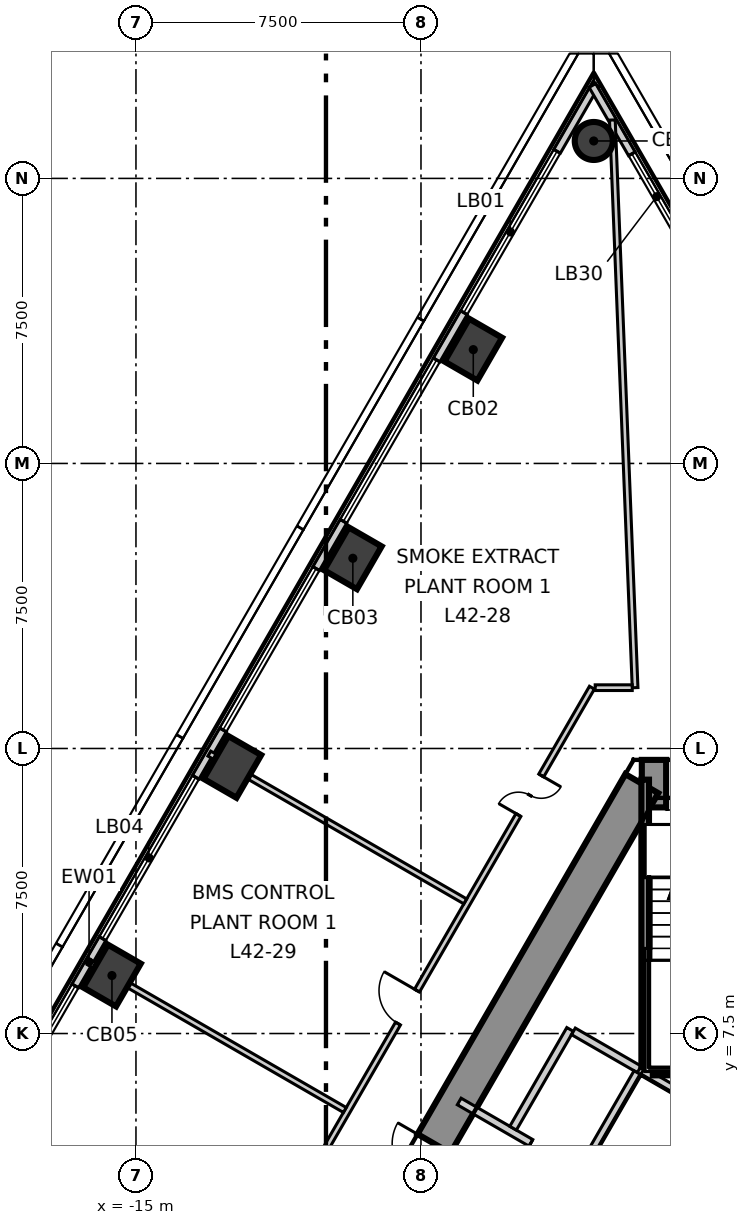
"""IFC4 building model, lengths in metres.
Left out: names, types, materials, properties, quantities, classifications, styles, units other than length and angle.
Written with IfcOpenShell. Run it as: python <this file> out.ifc"""

import sys

from ifc_helpers import new_model, si_unit, direction, frame, frame_2d, origin, origin_2d, place, context, subcontext, project, spatial, polyline, rectangle, circle, outline, extrude, element, fill, save


model = new_model("IFC4")
c1 = context("Model", 3, precision=1e-05, world=origin(), true_north=direction((0.0, 1.0)))
c2 = subcontext(c1, "Body", "Model", "MODEL_VIEW")
j1 = project(units=[si_unit("LENGTHUNIT", "METRE"), si_unit("PLANEANGLEUNIT", "RADIAN")], contexts=[c1])
p1 = place(None, origin())
s1 = spatial("IfcSite", under=j1, at=p1, CompositionType="ELEMENT")
p2 = place(p1, origin())
s2 = spatial("IfcBuilding", under=s1, at=p2, CompositionType="ELEMENT")
p3 = place(p2, frame((0.0, 0.0, 180.8)))
s3 = spatial("IfcBuildingStorey", under=s2, at=p3, CompositionType="ELEMENT", Elevation=180.8)
p4 = place(p3, frame((1.689, 14.075, -0.6), z_axis=(0.0, 0.0, 1.0), x_axis=(-1.0, 0.0, 0.0)))
e1 = element("IfcWall", 1, at=p4, inside=s3, PredefinedType="SHEAR", context=c2, shape_type="SweptSolid", body=[
    extrude(outline(polyline([(-0.216, -0.625), (1.689, -0.625), (3.594, -0.625), (3.161, 0.625), (1.689, 0.625), (0.217, 0.625), (-0.216, -0.625)])), origin(), (0.0, 0.0, 1.0), 4.5),
])
p5 = place(p4, frame((1.336, 0.0, 0.6)))
e2 = element("IfcOpeningElement", 2, at=p5, cuts=e1, PredefinedType="OPENING", context=c2, shape_type="SweptSolid", body=[
    extrude(rectangle(XDim=1.4, YDim=2.1, at=frame_2d((0.7, 1.05))), frame((0.0, 0.635, 0.0), z_axis=(0.0, -1.0, 0.0), x_axis=(1.0, 0.0, 0.0)), (0.0, 0.0, 1.0), 1.27),
])
p6 = place(p3, frame((-1.689, 14.075, -0.6), z_axis=(0.0, 0.0, 1.0), x_axis=(-0.500003116884, -0.866023604243, 0.0)))
e3 = element("IfcWall", 3, at=p6, inside=s3, PredefinedType="SHEAR", context=c2, shape_type="SweptSolid", body=[
    extrude(outline(polyline([(-0.433, -0.5), (1.53, -0.5), (3.493, -0.5), (5.456, -0.5), (7.419, -0.5), (9.382, -0.5), (11.345, -0.5), (13.308, -0.5), (15.271, -0.5), (17.234, -0.5), (19.197, -0.5), (21.16, -0.5), (23.123, -0.5), (22.257, 0.5), (20.273, 0.5), (18.289, 0.5), (16.305, 0.5), (14.321, 0.5), (12.337, 0.5), (10.353, 0.5), (8.369, 0.5), (6.385, 0.5), (4.401, 0.5), (2.417, 0.5), (0.433, 0.5), (-0.433, -0.5)])), origin(), (0.0, 0.0, 1.0), 4.5),
])
p7 = place(p6, frame((10.939, 0.0, 0.6)))
e4 = element("IfcOpeningElement", 4, at=p7, cuts=e3, PredefinedType="OPENING", context=c2, shape_type="SweptSolid", body=[
    extrude(rectangle(XDim=1.1, YDim=2.1, at=frame_2d((0.55, 1.05))), frame((0.0, 0.51, 0.0), z_axis=(0.0, -1.0, 0.0), x_axis=(1.0, 0.0, 0.0)), (0.0, 0.0, 1.0), 1.02),
])
p8 = place(p3, frame((-2.954, 30.985, -0.6), z_axis=(0.0, 0.0, 1.0), x_axis=(0.5, 0.866025403784, 0.0)))
e5 = element("IfcColumn", 5, at=p8, inside=s3, PredefinedType="COLUMN", context=c2, shape_type="SweptSolid", body=[
    extrude(circle(Radius=0.5, at=origin_2d()), origin(), (0.0, 0.0, 1.0), 4.5),
])
for number, where, z_axis, x_axis in (
    (6, (-6.124, 25.495, -0.6), (0.0, 0.0, 1.0), (0.5, 0.866, 0.0)),
    (7, (-9.293, 20.005, -0.6), (0.0, 0.0, 1.0), (0.5, 0.866, 0.0)),
    (8, (-12.463, 14.515, -0.6), (0.0, 0.0, 1.0), (0.5, 0.866, 0.0)),
    (9, (-15.632, 9.026, -0.6), (0.0, 0.0, 1.0), (0.5, 0.866, 0.0)),
):
    element("IfcColumn", number, at=place(p3, frame(where, z_axis=z_axis, x_axis=x_axis)), inside=s3, PredefinedType="COLUMN", context=c2, shape_type="SweptSolid", body=[
        extrude(rectangle(XDim=1.3, YDim=1.0, at=origin_2d()), origin(), (0.0, 0.0, 1.0), 4.5),
    ])
p9 = place(p3, frame((-2.909, 32.463, 0.0), z_axis=(0.0, 0.0, 1.0), x_axis=(-0.500011769953, -0.866018608292, 0.0)))
e10 = element("IfcWall", 10, at=p9, inside=s3, PredefinedType="ELEMENTEDWALL", context=c2, shape_type="SweptSolid", body=[
    extrude(rectangle(XDim=53.299, YDim=0.2, at=frame_2d((26.649, 0.0))), origin(), (0.0, 0.0, 1.0), 3.9),
])
p10 = place(p9, frame((2.022, 0.0, 0.6)))
e11 = element("IfcOpeningElement", 11, at=p10, cuts=e10, PredefinedType="OPENING", context=c2, shape_type="SweptSolid", body=[
    extrude(rectangle(XDim=4.9, YDim=3.0, at=frame_2d((2.45, 1.5))), frame((0.0, 0.11, 0.0), z_axis=(0.0, -1.0, 0.0), x_axis=(1.0, 0.0, 0.0)), (0.0, 0.0, 1.0), 0.22),
])
p11 = place(p9, frame((8.361, 0.0, 0.6)))
e12 = element("IfcOpeningElement", 12, at=p11, cuts=e10, PredefinedType="OPENING", context=c2, shape_type="SweptSolid", body=[
    extrude(rectangle(XDim=4.9, YDim=3.0, at=frame_2d((2.45, 1.5))), frame((0.0, 0.11, 0.0), z_axis=(0.0, -1.0, 0.0), x_axis=(1.0, 0.0, 0.0)), (0.0, 0.0, 1.0), 0.22),
])
p12 = place(p9, frame((14.7, 0.0, 0.6)))
e13 = element("IfcOpeningElement", 13, at=p12, cuts=e10, PredefinedType="OPENING", context=c2, shape_type="SweptSolid", body=[
    extrude(rectangle(XDim=4.9, YDim=3.0, at=frame_2d((2.45, 1.5))), frame((0.0, 0.11, 0.0), z_axis=(0.0, -1.0, 0.0), x_axis=(1.0, 0.0, 0.0)), (0.0, 0.0, 1.0), 0.22),
])
p13 = place(p9, frame((21.04, 0.0, 0.6)))
e14 = element("IfcOpeningElement", 14, at=p13, cuts=e10, PredefinedType="OPENING", context=c2, shape_type="SweptSolid", body=[
    extrude(rectangle(XDim=4.9, YDim=3.0, at=frame_2d((2.45, 1.5))), frame((0.0, 0.11, 0.0), z_axis=(0.0, -1.0, 0.0), x_axis=(1.0, 0.0, 0.0)), (0.0, 0.0, 1.0), 0.22),
])
p14 = place(p9, frame((27.379, 0.0, 0.6)))
e15 = element("IfcOpeningElement", 15, at=p14, cuts=e10, PredefinedType="OPENING", context=c2, shape_type="SweptSolid", body=[
    extrude(rectangle(XDim=4.9, YDim=3.0, at=frame_2d((2.45, 1.5))), frame((0.0, 0.11, 0.0), z_axis=(0.0, -1.0, 0.0), x_axis=(1.0, 0.0, 0.0)), (0.0, 0.0, 1.0), 0.22),
])
p15 = place(p9, frame((33.718, 0.0, 0.6)))
e16 = element("IfcOpeningElement", 16, at=p15, cuts=e10, PredefinedType="OPENING", context=c2, shape_type="SweptSolid", body=[
    extrude(rectangle(XDim=4.9, YDim=3.0, at=frame_2d((2.45, 1.5))), frame((0.0, 0.11, 0.0), z_axis=(0.0, -1.0, 0.0), x_axis=(1.0, 0.0, 0.0)), (0.0, 0.0, 1.0), 0.22),
])
p16 = place(p9, frame((40.057, 0.0, 0.6)))
e17 = element("IfcOpeningElement", 17, at=p16, cuts=e10, PredefinedType="OPENING", context=c2, shape_type="SweptSolid", body=[
    extrude(rectangle(XDim=4.9, YDim=3.0, at=frame_2d((2.45, 1.5))), frame((0.0, 0.11, 0.0), z_axis=(0.0, -1.0, 0.0), x_axis=(1.0, 0.0, 0.0)), (0.0, 0.0, 1.0), 0.22),
])
p17 = place(p9, frame((46.396, 0.0, 0.6)))
e18 = element("IfcOpeningElement", 18, at=p17, cuts=e10, PredefinedType="OPENING", context=c2, shape_type="SweptSolid", body=[
    extrude(rectangle(XDim=4.9, YDim=3.0, at=frame_2d((2.45, 1.5))), frame((0.0, 0.11, 0.0), z_axis=(0.0, -1.0, 0.0), x_axis=(1.0, 0.0, 0.0)), (0.0, 0.0, 1.0), 0.22),
])
p18 = place(p3, frame((0.045, 27.19, 0.0), z_axis=(0.0, 0.0, 1.0), x_axis=(-0.499916304465, 0.866073720032, 0.0)))
e19 = element("IfcWall", 19, at=p18, inside=s3, PredefinedType="ELEMENTEDWALL", context=c2, shape_type="SweptSolid", body=[
    extrude(rectangle(XDim=6.069, YDim=0.2, at=frame_2d((3.034, 0.0))), origin(), (0.0, 0.0, 1.0), 3.9),
])
p19 = place(p18, frame((1.39, 0.0, 0.6)))
e20 = element("IfcOpeningElement", 20, at=p19, cuts=e19, PredefinedType="OPENING", context=c2, shape_type="SweptSolid", body=[
    extrude(rectangle(XDim=2.6, YDim=3.0, at=frame_2d((1.3, 1.5))), frame((0.0, 0.11, 0.0), z_axis=(0.0, -1.0, 0.0), x_axis=(1.0, 0.0, 0.0)), (0.0, 0.0, 1.0), 0.22),
])
p20 = place(p3, frame((-15.877, -5.7, 0.0), z_axis=(0.0, 0.0, 1.0), x_axis=(0.500001771058, 0.866024381261, 0.0)))
e21 = element("IfcWall", 21, at=p20, inside=s3, PredefinedType="PARTITIONING", context=c2, shape_type="SweptSolid", body=[
    extrude(rectangle(XDim=25.75, YDim=0.15, at=frame_2d((12.875, 0.0))), origin(), (0.0, 0.0, 1.0), 3.9),
])
p21 = place(p20, frame((21.882, 0.0, 0.0)))
e22 = element("IfcOpeningElement", 22, at=p21, cuts=e21, PredefinedType="OPENING", context=c2, shape_type="SweptSolid", body=[
    extrude(rectangle(XDim=1.2, YDim=2.1, at=frame_2d((0.6, 1.05))), frame((0.0, 0.085, 0.0), z_axis=(0.0, -1.0, 0.0), x_axis=(1.0, 0.0, 0.0)), (0.0, 0.0, 1.0), 0.17),
])
p22 = place(p20, frame((15.545, 0.0, 0.0)))
e23 = element("IfcOpeningElement", 23, at=p22, cuts=e21, PredefinedType="OPENING", context=c2, shape_type="SweptSolid", body=[
    extrude(rectangle(XDim=1.0, YDim=2.1, at=frame_2d((0.5, 1.05))), frame((0.0, 0.085, 0.0), z_axis=(0.0, -1.0, 0.0), x_axis=(1.0, 0.0, 0.0)), (0.0, 0.0, 1.0), 0.17),
])
p23 = place(p20, frame((5.838, 0.0, 0.0)))
e24 = element("IfcOpeningElement", 24, at=p23, cuts=e21, PredefinedType="OPENING", context=c2, shape_type="SweptSolid", body=[
    extrude(rectangle(XDim=1.2, YDim=2.1, at=frame_2d((0.6, 1.05))), frame((0.0, 0.085, 0.0), z_axis=(0.0, -1.0, 0.0), x_axis=(1.0, 0.0, 0.0)), (0.0, 0.0, 1.0), 0.17),
])
p24 = place(p3, frame((-16.238, 9.376, 0.0), z_axis=(0.0, 0.0, 1.0), x_axis=(0.8660261172, -0.499998764326, 0.0)))
e25 = element("IfcWall", 25, at=p24, inside=s3, PredefinedType="PARTITIONING", context=c2, shape_type="SweptSolid", body=[
    extrude(rectangle(XDim=7.776, YDim=0.15, at=frame_2d((3.888, 0.0))), origin(), (0.0, 0.0, 1.0), 3.4),
])
p25 = place(p3, frame((-13.069, 14.865, 0.0), z_axis=(0.0, 0.0, 1.0), x_axis=(0.8660261172, -0.499998764326, 0.0)))
e26 = element("IfcWall", 26, at=p25, inside=s3, PredefinedType="PARTITIONING", context=c2, shape_type="SweptSolid", body=[
    extrude(rectangle(XDim=7.776, YDim=0.15, at=frame_2d((3.888, 0.0))), origin(), (0.0, 0.0, 1.0), 3.9),
])
p26 = place(p3, frame((-2.464, 31.537, 0.0), z_axis=(0.0, 0.0, 1.0), x_axis=(0.040012389266, -0.999199183699, 0.0)))
e27 = element("IfcWall", 27, at=p26, inside=s3, PredefinedType="PARTITIONING", context=c2, shape_type="SweptSolid", body=[
    extrude(rectangle(XDim=14.949, YDim=0.15, at=frame_2d((7.475, 0.0))), origin(), (0.0, 0.0, 1.0), 3.2),
])
p27 = place(p3, frame((-2.916, 16.6, 0.0), z_axis=(0.0, 0.0, 1.0), x_axis=(1.0, 0.0, 0.0)))
e28 = element("IfcWall", 28, at=p27, inside=s3, PredefinedType="PARTITIONING", context=c2, shape_type="SweptSolid", body=[
    extrude(rectangle(XDim=0.975, YDim=0.15, at=frame_2d((0.488, 0.0))), origin(), (0.0, 0.0, 1.0), 3.9),
])
p28 = place(p3, frame((-6.494, 5.712, 0.0), z_axis=(0.0, 0.0, 1.0), x_axis=(0.866064137879, -0.499932904579, 0.0)))
e29 = element("IfcWall", 29, at=p28, inside=s3, PredefinedType="SOLIDWALL", context=c2, shape_type="SweptSolid", body=[
    extrude(rectangle(XDim=3.682, YDim=0.2, at=frame_2d((1.841, 0.0))), origin(), (0.0, 0.0, 1.0), 3.9),
])
p29 = place(p28, frame((2.18, 0.0, 0.0)))
e30 = element("IfcOpeningElement", 30, at=p29, cuts=e29, PredefinedType="OPENING", context=c2, shape_type="SweptSolid", body=[
    extrude(rectangle(XDim=0.9, YDim=2.1, at=frame_2d((0.45, 1.05))), frame((0.0, 0.11, 0.0), z_axis=(0.0, -1.0, 0.0), x_axis=(1.0, 0.0, 0.0)), (0.0, 0.0, 1.0), 0.22),
])
p30 = place(p3, frame((-5.076, 5.009, 0.0), z_axis=(0.0, 0.0, 1.0), x_axis=(0.50002537861, 0.866010750942, 0.0)))
e31 = element("IfcWall", 31, at=p30, inside=s3, PredefinedType="SOLIDWALL", context=c2, shape_type="SweptSolid", body=[
    extrude(rectangle(XDim=3.0, YDim=0.2, at=frame_2d((1.5, 0.0))), origin(), (0.0, 0.0, 1.0), 3.9),
])
p31 = place(p3, frame((-3.489, 7.557, 0.0), z_axis=(0.0, 0.0, 1.0), x_axis=(0.866010750942, -0.50002537861, 0.0)))
e32 = element("IfcWall", 32, at=p31, inside=s3, PredefinedType="SOLIDWALL", context=c2, shape_type="SweptSolid", body=[
    extrude(rectangle(XDim=2.0, YDim=0.2, at=frame_2d((1.0, 0.0))), origin(), (0.0, 0.0, 1.0), 3.9),
])
p32 = place(p3, frame((-3.257, 3.959, 0.0), z_axis=(0.0, 0.0, 1.0), x_axis=(0.50012328804, 0.865954211699, 0.0)))
e33 = element("IfcWall", 33, at=p32, inside=s3, PredefinedType="SOLIDWALL", context=c2, shape_type="SweptSolid", body=[
    extrude(rectangle(XDim=2.9, YDim=0.2, at=frame_2d((1.45, 0.0))), origin(), (0.0, 0.0, 1.0), 3.9),
])
p33 = place(p3, frame((-1.67, 6.507, 0.0), z_axis=(0.0, 0.0, 1.0), x_axis=(0.865941441609, -0.500145398563, 0.0)))
e34 = element("IfcWall", 34, at=p33, inside=s3, PredefinedType="SOLIDWALL", context=c2, shape_type="SweptSolid", body=[
    extrude(rectangle(XDim=1.815, YDim=0.2, at=frame_2d((0.908, 0.0))), origin(), (0.0, 0.0, 1.0), 3.9),
])
p34 = place(p3, frame((-1.438, 2.909, 0.0), z_axis=(0.0, 0.0, 1.0), x_axis=(0.499829630636, 0.866123744241, 0.0)))
e35 = element("IfcWall", 35, at=p34, inside=s3, PredefinedType="SOLIDWALL", context=c2, shape_type="SweptSolid", body=[
    extrude(rectangle(XDim=2.761, YDim=0.2, at=frame_2d((1.38, 0.0))), origin(), (0.0, 0.0, 1.0), 3.9),
])
p35 = place(p3, frame((-1.4, 6.5, 0.0), z_axis=(0.0, 0.0, 1.0), x_axis=(1.0, 0.0, 0.0)))
e36 = element("IfcWall", 36, at=p35, inside=s3, PredefinedType="SOLIDWALL", context=c2, shape_type="SweptSolid", body=[
    extrude(rectangle(XDim=2.8, YDim=0.2, at=frame_2d((1.4, 0.0))), origin(), (0.0, 0.0, 1.0), 3.9),
])
p36 = place(p3, frame((-1.6, 6.615, 0.0), z_axis=(0.0, 0.0, 1.0), x_axis=(0.0, 1.0, 0.0)))
e37 = element("IfcWall", 37, at=p36, inside=s3, PredefinedType="SOLIDWALL", context=c2, shape_type="SweptSolid", body=[
    extrude(rectangle(XDim=7.565, YDim=0.2, at=frame_2d((3.782, 0.0))), origin(), (0.0, 0.0, 1.0), 3.9),
])
p37 = place(p10, origin())
e38 = element("IfcWindow", 38, at=p37, inside=s3, PartitioningType="SINGLE_PANEL", PredefinedType="WINDOW", context=c2, shape_type="SweptSolid", body=[
    extrude(rectangle(XDim=4.9, YDim=3.0, at=frame_2d((2.45, 1.5))), frame((0.0, 0.03, 0.0), z_axis=(0.0, -1.0, 0.0), x_axis=(1.0, 0.0, 0.0)), (0.0, 0.0, 1.0), 0.06),
])
fill(e11, e38)
p38 = place(p11, origin())
e39 = element("IfcWindow", 39, at=p38, inside=s3, PartitioningType="SINGLE_PANEL", PredefinedType="WINDOW", context=c2, shape_type="SweptSolid", body=[
    extrude(rectangle(XDim=4.9, YDim=3.0, at=frame_2d((2.45, 1.5))), frame((0.0, 0.03, 0.0), z_axis=(0.0, -1.0, 0.0), x_axis=(1.0, 0.0, 0.0)), (0.0, 0.0, 1.0), 0.06),
])
fill(e12, e39)
p39 = place(p12, origin())
e40 = element("IfcWindow", 40, at=p39, inside=s3, PartitioningType="SINGLE_PANEL", PredefinedType="WINDOW", context=c2, shape_type="SweptSolid", body=[
    extrude(rectangle(XDim=4.9, YDim=3.0, at=frame_2d((2.45, 1.5))), frame((0.0, 0.03, 0.0), z_axis=(0.0, -1.0, 0.0), x_axis=(1.0, 0.0, 0.0)), (0.0, 0.0, 1.0), 0.06),
])
fill(e13, e40)
p40 = place(p13, origin())
e41 = element("IfcWindow", 41, at=p40, inside=s3, PartitioningType="SINGLE_PANEL", PredefinedType="WINDOW", context=c2, shape_type="SweptSolid", body=[
    extrude(rectangle(XDim=4.9, YDim=3.0, at=frame_2d((2.45, 1.5))), frame((0.0, 0.03, 0.0), z_axis=(0.0, -1.0, 0.0), x_axis=(1.0, 0.0, 0.0)), (0.0, 0.0, 1.0), 0.06),
])
fill(e14, e41)
p41 = place(p14, origin())
e42 = element("IfcWindow", 42, at=p41, inside=s3, PartitioningType="SINGLE_PANEL", PredefinedType="WINDOW", context=c2, shape_type="SweptSolid", body=[
    extrude(rectangle(XDim=4.9, YDim=3.0, at=frame_2d((2.45, 1.5))), frame((0.0, 0.03, 0.0), z_axis=(0.0, -1.0, 0.0), x_axis=(1.0, 0.0, 0.0)), (0.0, 0.0, 1.0), 0.06),
])
fill(e15, e42)
p42 = place(p19, origin())
e43 = element("IfcWindow", 43, at=p42, inside=s3, PartitioningType="SINGLE_PANEL", PredefinedType="WINDOW", context=c2, shape_type="SweptSolid", body=[
    extrude(rectangle(XDim=2.6, YDim=3.0, at=frame_2d((1.3, 1.5))), frame((0.0, 0.03, 0.0), z_axis=(0.0, -1.0, 0.0), x_axis=(1.0, 0.0, 0.0)), (0.0, 0.0, 1.0), 0.06),
])
fill(e20, e43)
p43 = place(p29, origin())
e44 = element("IfcDoor", 44, at=p43, inside=s3, OperationType="SINGLE_SWING_LEFT", PredefinedType="DOOR", context=c2, shape_type="SweptSolid", body=[
    extrude(rectangle(XDim=0.9, YDim=2.1, at=frame_2d((0.45, 1.05))), frame((0.0, 0.025, 0.0), z_axis=(0.0, -1.0, 0.0), x_axis=(1.0, 0.0, 0.0)), (0.0, 0.0, 1.0), 0.05),
])
fill(e30, e44)
p44 = place(p21, origin())
e45 = element("IfcDoor", 45, at=p44, inside=s3, OperationType="DOUBLE_DOOR_SINGLE_SWING", PredefinedType="DOOR", context=c2, shape_type="SweptSolid", body=[
    extrude(rectangle(XDim=1.2, YDim=2.1, at=frame_2d((0.6, 1.05))), frame((0.0, 0.025, 0.0), z_axis=(0.0, -1.0, 0.0), x_axis=(1.0, 0.0, 0.0)), (0.0, 0.0, 1.0), 0.05),
])
fill(e22, e45)
p45 = place(p22, origin())
e46 = element("IfcDoor", 46, at=p45, inside=s3, OperationType="SINGLE_SWING_LEFT", PredefinedType="DOOR", context=c2, shape_type="SweptSolid", body=[
    extrude(rectangle(XDim=1.0, YDim=2.1, at=frame_2d((0.5, 1.05))), frame((0.0, 0.025, 0.0), z_axis=(0.0, -1.0, 0.0), x_axis=(1.0, 0.0, 0.0)), (0.0, 0.0, 1.0), 0.05),
])
fill(e23, e46)
p46 = place(p5, origin())
e47 = element("IfcDoor", 47, at=p46, inside=s3, OperationType="DOUBLE_DOOR_SINGLE_SWING", PredefinedType="DOOR", context=c2, shape_type="SweptSolid", body=[
    extrude(rectangle(XDim=1.4, YDim=2.1, at=frame_2d((0.7, 1.05))), frame((0.0, 0.025, 0.0), z_axis=(0.0, -1.0, 0.0), x_axis=(1.0, 0.0, 0.0)), (0.0, 0.0, 1.0), 0.05),
])
fill(e2, e47)
p47 = place(p7, origin())
e48 = element("IfcDoor", 48, at=p47, inside=s3, OperationType="SINGLE_SWING_LEFT", PredefinedType="DOOR", context=c2, shape_type="SweptSolid", body=[
    extrude(rectangle(XDim=1.1, YDim=2.1, at=frame_2d((0.55, 1.05))), frame((0.0, 0.025, 0.0), z_axis=(0.0, -1.0, 0.0), x_axis=(1.0, 0.0, 0.0)), (0.0, 0.0, 1.0), 0.05),
])
fill(e4, e48)
save(model, sys.argv[1])
